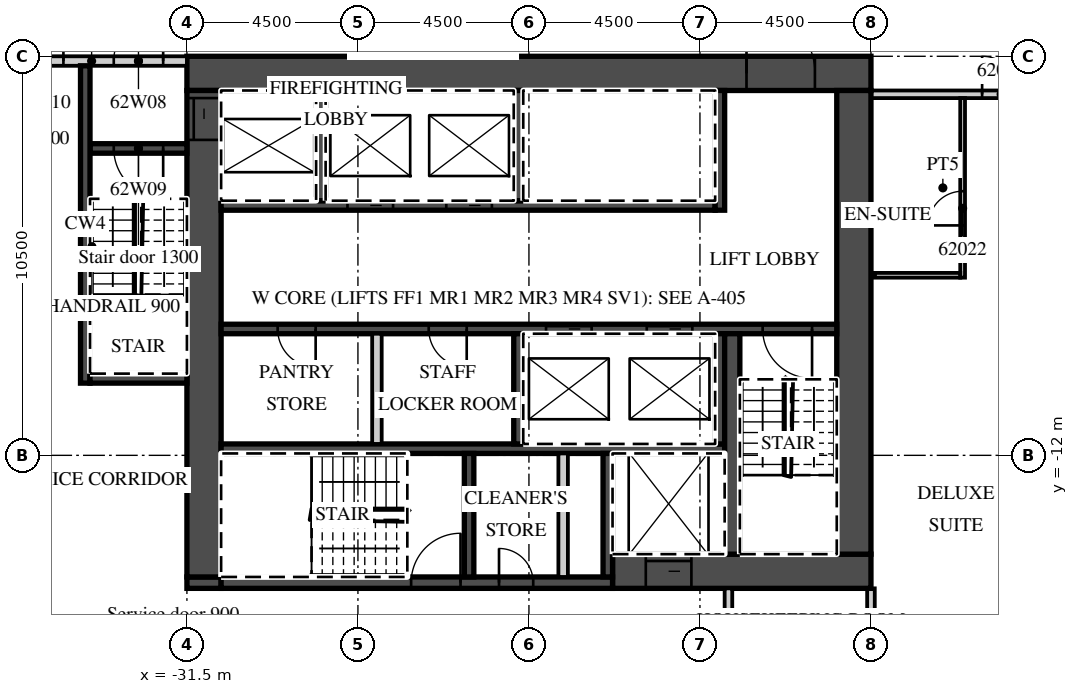
"""IFC4 building model, lengths in metres.
Left out: names, types, materials, properties, quantities, classifications, styles, units other than length and angle.
Written with IfcOpenShell. Run it as: python <this file> out.ifc"""

import sys

from ifc_helpers import new_model, si_unit, direction, frame, frame_2d, origin, place, context, subcontext, project, spatial, rectangle, extrude, element, fill, save


model = new_model("IFC4")
c1 = context("Model", 3, precision=1e-05, world=origin(), true_north=direction((0.0, 1.0)))
c2 = subcontext(c1, "Body", "Model", "MODEL_VIEW")
j1 = project(units=[si_unit("LENGTHUNIT", "METRE"), si_unit("PLANEANGLEUNIT", "RADIAN")], contexts=[c1])
p1 = place(None, origin())
s1 = spatial("IfcSite", under=j1, at=p1, CompositionType="ELEMENT")
p2 = place(p1, origin())
s2 = spatial("IfcBuilding", under=s1, at=p2, CompositionType="ELEMENT")
p3 = place(p2, frame((0.0, 0.0, 250.7)))
s3 = spatial("IfcBuildingStorey", under=s2, at=p3, CompositionType="ELEMENT", Elevation=250.7)
p4 = place(p3, frame((-13.5, -19.641, 0.0), z_axis=(0.0, 0.0, 1.0), x_axis=(0.0, 1.0, 0.0)))
e1 = element("IfcWall", 1, at=p4, inside=s3, PredefinedType="PARTITIONING", context=c2, shape_type="SweptSolid", body=[
    extrude(rectangle(XDim=4.141, YDim=0.2, at=frame_2d((2.071, 0.0))), origin(), (0.0, 0.0, 1.0), 3.02),
])
p5 = place(p3, frame((-13.5, -2.5, 0.0), z_axis=(0.0, 0.0, 1.0), x_axis=(1.0, 0.0, 0.0)))
e2 = element("IfcWall", 2, at=p5, inside=s3, PredefinedType="PARTITIONING", context=c2, shape_type="SweptSolid", body=[
    extrude(rectangle(XDim=27.0, YDim=0.2, at=frame_2d((13.5, 0.0))), origin(), (0.0, 0.0, 1.0), 3.02),
])
p6 = place(p5, frame((2.925, 0.0, 0.0)))
e3 = element("IfcOpeningElement", 3, at=p6, cuts=e2, PredefinedType="OPENING", context=c2, shape_type="SweptSolid", body=[
    extrude(rectangle(XDim=1.0, YDim=2.1, at=frame_2d((0.5, 1.05))), frame((0.0, 0.11, 0.0), z_axis=(0.0, -1.0, 0.0), x_axis=(1.0, 0.0, 0.0)), (0.0, 0.0, 1.0), 0.22),
])
p7 = place(p5, frame((6.938, 0.0, 0.0)))
e4 = element("IfcOpeningElement", 4, at=p7, cuts=e2, PredefinedType="OPENING", context=c2, shape_type="SweptSolid", body=[
    extrude(rectangle(XDim=1.2, YDim=2.1, at=frame_2d((0.6, 1.05))), frame((0.0, 0.11, 0.0), z_axis=(0.0, -1.0, 0.0), x_axis=(1.0, 0.0, 0.0)), (0.0, 0.0, 1.0), 0.22),
])
p8 = place(p5, frame((18.862, 0.0, 0.0)))
e5 = element("IfcOpeningElement", 5, at=p8, cuts=e2, PredefinedType="OPENING", context=c2, shape_type="SweptSolid", body=[
    extrude(rectangle(XDim=1.2, YDim=2.1, at=frame_2d((0.6, 1.05))), frame((0.0, 0.11, 0.0), z_axis=(0.0, -1.0, 0.0), x_axis=(1.0, 0.0, 0.0)), (0.0, 0.0, 1.0), 0.22),
])
p9 = place(p5, frame((23.075, 0.0, 0.0)))
e6 = element("IfcOpeningElement", 6, at=p9, cuts=e2, PredefinedType="OPENING", context=c2, shape_type="SweptSolid", body=[
    extrude(rectangle(XDim=1.0, YDim=2.1, at=frame_2d((0.5, 1.05))), frame((0.0, 0.11, 0.0), z_axis=(0.0, -1.0, 0.0), x_axis=(1.0, 0.0, 0.0)), (0.0, 0.0, 1.0), 0.22),
])
p10 = place(p3, frame((-11.088, -7.325, 0.0), z_axis=(0.0, 0.0, 1.0), x_axis=(0.0, 1.0, 0.0)))
e7 = element("IfcWall", 7, at=p10, inside=s3, PredefinedType="PARTITIONING", context=c2, shape_type="SweptSolid", body=[
    extrude(rectangle(XDim=4.725, YDim=0.125, at=frame_2d((2.362, 0.0))), origin(), (0.0, 0.0, 1.0), 3.02),
])
p11 = place(p10, frame((1.375, 0.0, 0.0)))
e8 = element("IfcOpeningElement", 8, at=p11, cuts=e7, PredefinedType="OPENING", context=c2, shape_type="SweptSolid", body=[
    extrude(rectangle(XDim=0.9, YDim=2.1, at=frame_2d((0.45, 1.05))), frame((0.0, 0.073, 0.0), z_axis=(0.0, -1.0, 0.0), x_axis=(1.0, 0.0, 0.0)), (0.0, 0.0, 1.0), 0.145),
])
p12 = place(p3, frame((-13.4, -7.262, 0.0), z_axis=(0.0, 0.0, 1.0), x_axis=(1.0, 0.0, 0.0)))
e9 = element("IfcWall", 9, at=p12, inside=s3, PredefinedType="PARTITIONING", context=c2, shape_type="SweptSolid", body=[
    extrude(rectangle(XDim=2.25, YDim=0.125, at=frame_2d((1.125, 0.0))), origin(), (0.0, 0.0, 1.0), 3.02),
])
p13 = place(p3, frame((-31.5, -1.95, 0.0), z_axis=(0.0, 0.0, 1.0), x_axis=(1.0, 0.0, 0.0)))
e10 = element("IfcWall", 10, at=p13, inside=s3, PredefinedType="SHEAR", context=c2, shape_type="SweptSolid", body=[
    extrude(rectangle(XDim=18.0, YDim=0.9, at=frame_2d((9.0, 0.0))), origin(), (0.0, 0.0, 1.0), 3.02),
])
p14 = place(p13, frame((14.725, 0.0, 0.0)))
e11 = element("IfcOpeningElement", 11, at=p14, cuts=e10, PredefinedType="OPENING", context=c2, shape_type="SweptSolid", body=[
    extrude(rectangle(XDim=1.8, YDim=2.1, at=frame_2d((0.9, 1.05))), frame((0.0, 0.46, 0.0), z_axis=(0.0, -1.0, 0.0), x_axis=(1.0, 0.0, 0.0)), (0.0, 0.0, 1.0), 0.92),
])
p15 = place(p3, frame((-20.3, -15.05, 0.0), z_axis=(0.0, 0.0, 1.0), x_axis=(1.0, 0.0, 0.0)))
e12 = element("IfcWall", 12, at=p15, inside=s3, PredefinedType="SHEAR", context=c2, shape_type="SweptSolid", body=[
    extrude(rectangle(XDim=6.8, YDim=0.9, at=frame_2d((3.4, 0.0))), origin(), (0.0, 0.0, 1.0), 3.02),
])
p16 = place(p15, frame((0.875, 0.0, 0.0)))
e13 = element("IfcOpeningElement", 13, at=p16, cuts=e12, PredefinedType="OPENING", context=c2, shape_type="SweptSolid", body=[
    extrude(rectangle(XDim=1.2, YDim=2.1, at=frame_2d((0.6, 1.05))), frame((0.0, 0.46, 0.0), z_axis=(0.0, -1.0, 0.0), x_axis=(1.0, 0.0, 0.0)), (0.0, 0.0, 1.0), 0.92),
])
p17 = place(p3, frame((-31.5, -15.35, 0.0), z_axis=(0.0, 0.0, 1.0), x_axis=(1.0, 0.0, 0.0)))
e14 = element("IfcWall", 14, at=p17, inside=s3, PredefinedType="SHEAR", context=c2, shape_type="SweptSolid", body=[
    extrude(rectangle(XDim=0.9, YDim=0.3, at=frame_2d((0.45, 0.0))), origin(), (0.0, 0.0, 1.0), 3.02),
])
p18 = place(p3, frame((-30.6, -15.35, 0.0), z_axis=(0.0, 0.0, 1.0), x_axis=(1.0, 0.0, 0.0)))
e15 = element("IfcWall", 15, at=p18, inside=s3, PredefinedType="SHEAR", context=c2, shape_type="SweptSolid", body=[
    extrude(rectangle(XDim=10.3, YDim=0.3, at=frame_2d((5.15, 0.0))), origin(), (0.0, 0.0, 1.0), 3.02),
])
p19 = place(p18, frame((5.0, 0.0, 0.0)))
e16 = element("IfcOpeningElement", 16, at=p19, cuts=e15, PredefinedType="OPENING", context=c2, shape_type="SweptSolid", body=[
    extrude(rectangle(XDim=1.3, YDim=2.1, at=frame_2d((0.65, 1.05))), frame((0.0, 0.16, 0.0), z_axis=(0.0, -1.0, 0.0), x_axis=(1.0, 0.0, 0.0)), (0.0, 0.0, 1.0), 0.32),
])
p20 = place(p18, frame((7.312, 0.0, 0.0)))
e17 = element("IfcOpeningElement", 17, at=p20, cuts=e15, PredefinedType="OPENING", context=c2, shape_type="SweptSolid", body=[
    extrude(rectangle(XDim=0.9, YDim=2.1, at=frame_2d((0.45, 1.05))), frame((0.0, 0.16, 0.0), z_axis=(0.0, -1.0, 0.0), x_axis=(1.0, 0.0, 0.0)), (0.0, 0.0, 1.0), 0.32),
])
p21 = place(p3, frame((-31.05, -15.2, 0.0), z_axis=(0.0, 0.0, 1.0), x_axis=(0.0, 1.0, 0.0)))
e18 = element("IfcWall", 18, at=p21, inside=s3, PredefinedType="SHEAR", context=c2, shape_type="SweptSolid", body=[
    extrude(rectangle(XDim=12.8, YDim=0.9, at=frame_2d((6.4, 0.0))), origin(), (0.0, 0.0, 1.0), 3.02),
])
p22 = place(p21, frame((11.5, 0.0, 0.0)))
e19 = element("IfcOpeningElement", 19, at=p22, cuts=e18, PredefinedType="OPENING", context=c2, shape_type="SweptSolid", body=[
    extrude(rectangle(XDim=1.1, YDim=2.1, at=frame_2d((0.55, 1.05))), frame((0.0, 0.46, 0.0), z_axis=(0.0, -1.0, 0.0), x_axis=(1.0, 0.0, 0.0)), (0.0, 0.0, 1.0), 0.92),
])
p23 = place(p3, frame((-13.95, -14.6, 0.0), z_axis=(0.0, 0.0, 1.0), x_axis=(0.0, 1.0, 0.0)))
e20 = element("IfcWall", 20, at=p23, inside=s3, PredefinedType="SHEAR", context=c2, shape_type="SweptSolid", body=[
    extrude(rectangle(XDim=12.2, YDim=0.9, at=frame_2d((6.1, 0.0))), origin(), (0.0, 0.0, 1.0), 3.02),
])
p24 = place(p3, frame((-30.6, -5.425, 0.0), z_axis=(0.0, 0.0, 1.0), x_axis=(1.0, 0.0, 0.0)))
e21 = element("IfcWall", 21, at=p24, inside=s3, PredefinedType="SHEAR", context=c2, shape_type="SweptSolid", body=[
    extrude(rectangle(XDim=13.0, YDim=0.25, at=frame_2d((6.5, 0.0))), origin(), (0.0, 0.0, 1.0), 3.02),
])
p25 = place(p24, frame((3.325, 0.0, 0.0)))
e22 = element("IfcOpeningElement", 22, at=p25, cuts=e21, PredefinedType="OPENING", context=c2, shape_type="SweptSolid", body=[
    extrude(rectangle(XDim=1.2, YDim=2.1, at=frame_2d((0.6, 1.05))), frame((0.0, 0.135, 0.0), z_axis=(0.0, -1.0, 0.0), x_axis=(1.0, 0.0, 0.0)), (0.0, 0.0, 1.0), 0.27),
])
p26 = place(p24, frame((5.925, 0.0, 0.0)))
e23 = element("IfcOpeningElement", 23, at=p26, cuts=e21, PredefinedType="OPENING", context=c2, shape_type="SweptSolid", body=[
    extrude(rectangle(XDim=1.2, YDim=2.1, at=frame_2d((0.6, 1.05))), frame((0.0, 0.135, 0.0), z_axis=(0.0, -1.0, 0.0), x_axis=(1.0, 0.0, 0.0)), (0.0, 0.0, 1.0), 0.27),
])
p27 = place(p3, frame((-17.475, -5.55, 0.0), z_axis=(0.0, 0.0, 1.0), x_axis=(0.0, 1.0, 0.0)))
e24 = element("IfcWall", 24, at=p27, inside=s3, PredefinedType="SHEAR", context=c2, shape_type="SweptSolid", body=[
    extrude(rectangle(XDim=3.15, YDim=0.25, at=frame_2d((1.575, 0.0))), origin(), (0.0, 0.0, 1.0), 3.02),
])
for number, where, z_axis, x_axis in (
    (25, (-27.975, -5.3, 0.0), (0.0, 0.0, 1.0), (0.0, 1.0, 0.0)),
    (26, (-22.775, -5.3, 0.0), (0.0, 0.0, 1.0), (0.0, 1.0, 0.0)),
):
    element("IfcWall", number, at=place(p3, frame(where, z_axis=z_axis, x_axis=x_axis)), inside=s3, PredefinedType="SHEAR", context=c2, shape_type="SweptSolid", body=[
        extrude(rectangle(XDim=2.9, YDim=0.25, at=frame_2d((1.45, 0.0))), origin(), (0.0, 0.0, 1.0), 3.02),
    ])
p28 = place(p3, frame((-30.6, -8.675, 0.0), z_axis=(0.0, 0.0, 1.0), x_axis=(1.0, 0.0, 0.0)))
e27 = element("IfcWall", 27, at=p28, inside=s3, PredefinedType="SHEAR", context=c2, shape_type="SweptSolid", body=[
    extrude(rectangle(XDim=16.2, YDim=0.25, at=frame_2d((8.1, 0.0))), origin(), (0.0, 0.0, 1.0), 3.02),
])
p29 = place(p28, frame((8.55, 0.0, 0.0)))
e28 = element("IfcOpeningElement", 28, at=p29, cuts=e27, PredefinedType="OPENING", context=c2, shape_type="SweptSolid", body=[
    extrude(rectangle(XDim=1.2, YDim=2.1, at=frame_2d((0.6, 1.05))), frame((0.0, 0.135, 0.0), z_axis=(0.0, -1.0, 0.0), x_axis=(1.0, 0.0, 0.0)), (0.0, 0.0, 1.0), 0.27),
])
p30 = place(p28, frame((11.2, 0.0, 0.0)))
e29 = element("IfcOpeningElement", 29, at=p30, cuts=e27, PredefinedType="OPENING", context=c2, shape_type="SweptSolid", body=[
    extrude(rectangle(XDim=1.2, YDim=2.1, at=frame_2d((0.6, 1.05))), frame((0.0, 0.135, 0.0), z_axis=(0.0, -1.0, 0.0), x_axis=(1.0, 0.0, 0.0)), (0.0, 0.0, 1.0), 0.27),
])
p31 = place(p28, frame((14.25, 0.0, 0.0)))
e30 = element("IfcOpeningElement", 30, at=p31, cuts=e27, PredefinedType="OPENING", context=c2, shape_type="SweptSolid", body=[
    extrude(rectangle(XDim=1.3, YDim=2.1, at=frame_2d((0.65, 1.05))), frame((0.0, 0.135, 0.0), z_axis=(0.0, -1.0, 0.0), x_axis=(1.0, 0.0, 0.0)), (0.0, 0.0, 1.0), 0.27),
])
p32 = place(p28, frame((1.488, 0.0, 0.0)))
e31 = element("IfcOpeningElement", 31, at=p32, cuts=e27, PredefinedType="OPENING", context=c2, shape_type="SweptSolid", body=[
    extrude(rectangle(XDim=1.0, YDim=2.1, at=frame_2d((0.5, 1.05))), frame((0.0, 0.135, 0.0), z_axis=(0.0, -1.0, 0.0), x_axis=(1.0, 0.0, 0.0)), (0.0, 0.0, 1.0), 0.27),
])
p33 = place(p28, frame((5.462, 0.0, 0.0)))
e32 = element("IfcOpeningElement", 32, at=p33, cuts=e27, PredefinedType="OPENING", context=c2, shape_type="SweptSolid", body=[
    extrude(rectangle(XDim=1.0, YDim=2.1, at=frame_2d((0.5, 1.05))), frame((0.0, 0.135, 0.0), z_axis=(0.0, -1.0, 0.0), x_axis=(1.0, 0.0, 0.0)), (0.0, 0.0, 1.0), 0.27),
])
p34 = place(p3, frame((-30.6, -11.825, 0.0), z_axis=(0.0, 0.0, 1.0), x_axis=(1.0, 0.0, 0.0)))
e33 = element("IfcWall", 33, at=p34, inside=s3, PredefinedType="SHEAR", context=c2, shape_type="SweptSolid", body=[
    extrude(rectangle(XDim=13.25, YDim=0.25, at=frame_2d((6.625, 0.0))), origin(), (0.0, 0.0, 1.0), 3.02),
])
for number, where, z_axis, x_axis in (
    (34, (-17.475, -11.7, 0.0), (0.0, 0.0, 1.0), (0.0, 1.0, 0.0)),
    (35, (-22.775, -11.7, 0.0), (0.0, 0.0, 1.0), (0.0, 1.0, 0.0)),
):
    element("IfcWall", number, at=place(p3, frame(where, z_axis=z_axis, x_axis=x_axis)), inside=s3, PredefinedType="SHEAR", context=c2, shape_type="SweptSolid", body=[
        extrude(rectangle(XDim=2.9, YDim=0.25, at=frame_2d((1.45, 0.0))), origin(), (0.0, 0.0, 1.0), 3.02),
    ])
p35 = place(p3, frame((-26.5, -11.7, 0.0), z_axis=(0.0, 0.0, 1.0), x_axis=(0.0, 1.0, 0.0)))
e36 = element("IfcWall", 36, at=p35, inside=s3, PredefinedType="PARTITIONING", context=c2, shape_type="SweptSolid", body=[
    extrude(rectangle(XDim=2.9, YDim=0.25, at=frame_2d((1.45, 0.0))), origin(), (0.0, 0.0, 1.0), 3.02),
])
p36 = place(p3, frame((-17.15, -14.6, 0.0), z_axis=(0.0, 0.0, 1.0), x_axis=(0.0, 1.0, 0.0)))
e37 = element("IfcWall", 37, at=p36, inside=s3, PredefinedType="SHEAR", context=c2, shape_type="SweptSolid", body=[
    extrude(rectangle(XDim=5.8, YDim=0.4, at=frame_2d((2.9, 0.0))), origin(), (0.0, 0.0, 1.0), 3.02),
])
for number, where, z_axis, x_axis in (
    (38, (-20.425, -15.2, 0.0), (0.0, 0.0, 1.0), (0.0, 1.0, 0.0)),
    (39, (-24.075, -15.2, 0.0), (0.0, 0.0, 1.0), (0.0, 1.0, 0.0)),
):
    element("IfcWall", number, at=place(p3, frame(where, z_axis=z_axis, x_axis=x_axis)), inside=s3, PredefinedType="SHEAR", context=c2, shape_type="SweptSolid", body=[
        extrude(rectangle(XDim=3.25, YDim=0.25, at=frame_2d((1.625, 0.0))), origin(), (0.0, 0.0, 1.0), 3.02),
    ])
p37 = place(p3, frame((-21.6, -15.2, 0.0), z_axis=(0.0, 0.0, 1.0), x_axis=(0.0, 1.0, 0.0)))
e40 = element("IfcWall", 40, at=p37, inside=s3, PredefinedType="PARTITIONING", context=c2, shape_type="SweptSolid", body=[
    extrude(rectangle(XDim=3.25, YDim=0.25, at=frame_2d((1.625, 0.0))), origin(), (0.0, 0.0, 1.0), 3.02),
])
p38 = place(p3, frame((-36.515, -1.625, 0.0), z_axis=(0.0, 0.0, 1.0), x_axis=(1.0, 0.0, 0.0)))
e41 = element("IfcWall", 41, at=p38, inside=s3, PredefinedType="PARTITIONING", context=c2, shape_type="SweptSolid", body=[
    extrude(rectangle(XDim=5.015, YDim=0.25, at=frame_2d((2.508, 0.0))), origin(), (0.0, 0.0, 1.0), 3.02),
])
p39 = place(p38, frame((3.09, 0.0, 0.0)))
e42 = element("IfcOpeningElement", 42, at=p39, cuts=e41, PredefinedType="OPENING", context=c2, shape_type="SweptSolid", body=[
    extrude(rectangle(XDim=1.3, YDim=2.1, at=frame_2d((0.65, 1.05))), frame((0.0, 0.135, 0.0), z_axis=(0.0, -1.0, 0.0), x_axis=(1.0, 0.0, 0.0)), (0.0, 0.0, 1.0), 0.27),
])
p40 = place(p38, frame((0.665, 0.0, 0.0)))
e43 = element("IfcOpeningElement", 43, at=p40, cuts=e41, PredefinedType="OPENING", context=c2, shape_type="SweptSolid", body=[
    extrude(rectangle(XDim=1.1, YDim=2.1, at=frame_2d((0.55, 1.05))), frame((0.0, 0.135, 0.0), z_axis=(0.0, -1.0, 0.0), x_axis=(1.0, 0.0, 0.0)), (0.0, 0.0, 1.0), 0.27),
])
p41 = place(p3, frame((-34.05, -3.925, 0.0), z_axis=(0.0, 0.0, 1.0), x_axis=(1.0, 0.0, 0.0)))
e44 = element("IfcWall", 44, at=p41, inside=s3, PredefinedType="SHEAR", context=c2, shape_type="SweptSolid", body=[
    extrude(rectangle(XDim=2.55, YDim=0.25, at=frame_2d((1.275, 0.0))), origin(), (0.0, 0.0, 1.0), 3.02),
])
p42 = place(p41, frame((0.625, 0.0, 0.0)))
e45 = element("IfcOpeningElement", 45, at=p42, cuts=e44, PredefinedType="OPENING", context=c2, shape_type="SweptSolid", body=[
    extrude(rectangle(XDim=1.3, YDim=2.1, at=frame_2d((0.65, 1.05))), frame((0.0, 0.135, 0.0), z_axis=(0.0, -1.0, 0.0), x_axis=(1.0, 0.0, 0.0)), (0.0, 0.0, 1.0), 0.27),
])
p43 = place(p3, frame((-34.175, -10.1, 0.0), z_axis=(0.0, 0.0, 1.0), x_axis=(0.0, 1.0, 0.0)))
e46 = element("IfcWall", 46, at=p43, inside=s3, PredefinedType="SHEAR", context=c2, shape_type="SweptSolid", body=[
    extrude(rectangle(XDim=8.35, YDim=0.25, at=frame_2d((4.175, 0.0))), origin(), (0.0, 0.0, 1.0), 3.02),
])
p44 = place(p3, frame((-34.05, -9.975, 0.0), z_axis=(0.0, 0.0, 1.0), x_axis=(1.0, 0.0, 0.0)))
e47 = element("IfcWall", 47, at=p44, inside=s3, PredefinedType="SHEAR", context=c2, shape_type="SweptSolid", body=[
    extrude(rectangle(XDim=2.55, YDim=0.25, at=frame_2d((1.275, 0.0))), origin(), (0.0, 0.0, 1.0), 3.02),
])
p45 = place(p3, frame((-17.25, -17.7, 0.0), z_axis=(0.0, 0.0, 1.0), x_axis=(0.0, 1.0, 0.0)))
e48 = element("IfcWall", 48, at=p45, inside=s3, PredefinedType="PARTITIONING", context=c2, shape_type="SweptSolid", body=[
    extrude(rectangle(XDim=2.2, YDim=0.2, at=frame_2d((1.1, 0.0))), origin(), (0.0, 0.0, 1.0), 3.02),
])
p46 = place(p6, origin())
e49 = element("IfcDoor", 49, at=p46, inside=s3, OperationType="SINGLE_SWING_LEFT", PredefinedType="DOOR", context=c2, shape_type="SweptSolid", body=[
    extrude(rectangle(XDim=1.0, YDim=2.1, at=frame_2d((0.5, 1.05))), frame((0.0, 0.025, 0.0), z_axis=(0.0, -1.0, 0.0), x_axis=(1.0, 0.0, 0.0)), (0.0, 0.0, 1.0), 0.05),
])
fill(e3, e49)
p47 = place(p11, origin())
e50 = element("IfcDoor", 50, at=p47, inside=s3, OperationType="SINGLE_SWING_LEFT", PredefinedType="DOOR", context=c2, shape_type="SweptSolid", body=[
    extrude(rectangle(XDim=0.9, YDim=2.1, at=frame_2d((0.45, 1.05))), frame((0.0, 0.025, 0.0), z_axis=(0.0, -1.0, 0.0), x_axis=(1.0, 0.0, 0.0)), (0.0, 0.0, 1.0), 0.05),
])
fill(e8, e50)
p48 = place(p29, origin())
e51 = element("IfcDoor", 51, at=p48, inside=s3, OperationType="SLIDING_TO_LEFT", PredefinedType="DOOR", context=c2, shape_type="SweptSolid", body=[
    extrude(rectangle(XDim=1.2, YDim=2.1, at=frame_2d((0.6, 1.05))), frame((0.0, 0.025, 0.0), z_axis=(0.0, -1.0, 0.0), x_axis=(1.0, 0.0, 0.0)), (0.0, 0.0, 1.0), 0.05),
])
fill(e28, e51)
p49 = place(p30, origin())
e52 = element("IfcDoor", 52, at=p49, inside=s3, OperationType="SLIDING_TO_RIGHT", PredefinedType="DOOR", context=c2, shape_type="SweptSolid", body=[
    extrude(rectangle(XDim=1.2, YDim=2.1, at=frame_2d((0.6, 1.05))), frame((0.0, 0.025, 0.0), z_axis=(0.0, -1.0, 0.0), x_axis=(1.0, 0.0, 0.0)), (0.0, 0.0, 1.0), 0.05),
])
fill(e29, e52)
p50 = place(p25, origin())
e53 = element("IfcDoor", 53, at=p50, inside=s3, OperationType="SLIDING_TO_RIGHT", PredefinedType="DOOR", context=c2, shape_type="SweptSolid", body=[
    extrude(rectangle(XDim=1.2, YDim=2.1, at=frame_2d((0.6, 1.05))), frame((0.0, 0.025, 0.0), z_axis=(0.0, -1.0, 0.0), x_axis=(1.0, 0.0, 0.0)), (0.0, 0.0, 1.0), 0.05),
])
fill(e22, e53)
p51 = place(p26, origin())
e54 = element("IfcDoor", 54, at=p51, inside=s3, OperationType="SLIDING_TO_RIGHT", PredefinedType="DOOR", context=c2, shape_type="SweptSolid", body=[
    extrude(rectangle(XDim=1.2, YDim=2.1, at=frame_2d((0.6, 1.05))), frame((0.0, 0.025, 0.0), z_axis=(0.0, -1.0, 0.0), x_axis=(1.0, 0.0, 0.0)), (0.0, 0.0, 1.0), 0.05),
])
fill(e23, e54)
p52 = place(p16, origin())
e55 = element("IfcDoor", 55, at=p52, inside=s3, OperationType="SLIDING_TO_LEFT", PredefinedType="DOOR", context=c2, shape_type="SweptSolid", body=[
    extrude(rectangle(XDim=1.2, YDim=2.1, at=frame_2d((0.6, 1.05))), frame((0.0, 0.025, 0.0), z_axis=(0.0, -1.0, 0.0), x_axis=(1.0, 0.0, 0.0)), (0.0, 0.0, 1.0), 0.05),
])
fill(e13, e55)
p53 = place(p22, origin())
e56 = element("IfcDoor", 56, at=p53, inside=s3, OperationType="SLIDING_TO_RIGHT", PredefinedType="DOOR", context=c2, shape_type="SweptSolid", body=[
    extrude(rectangle(XDim=1.1, YDim=2.1, at=frame_2d((0.55, 1.05))), frame((0.0, 0.025, 0.0), z_axis=(0.0, -1.0, 0.0), x_axis=(1.0, 0.0, 0.0)), (0.0, 0.0, 1.0), 0.05),
])
fill(e19, e56)
p54 = place(p14, origin())
e57 = element("IfcDoor", 57, at=p54, inside=s3, OperationType="DOUBLE_DOOR_DOUBLE_SWING", PredefinedType="DOOR", context=c2, shape_type="SweptSolid", body=[
    extrude(rectangle(XDim=1.8, YDim=2.1, at=frame_2d((0.9, 1.05))), frame((0.0, 0.025, 0.0), z_axis=(0.0, -1.0, 0.0), x_axis=(1.0, 0.0, 0.0)), (0.0, 0.0, 1.0), 0.05),
])
fill(e11, e57)
p55 = place(p39, origin())
e58 = element("IfcDoor", 58, at=p55, inside=s3, OperationType="SINGLE_SWING_RIGHT", PredefinedType="DOOR", context=c2, shape_type="SweptSolid", body=[
    extrude(rectangle(XDim=1.3, YDim=2.1, at=frame_2d((0.65, 1.05))), frame((0.0, 0.025, 0.0), z_axis=(0.0, -1.0, 0.0), x_axis=(1.0, 0.0, 0.0)), (0.0, 0.0, 1.0), 0.05),
])
fill(e42, e58)
p56 = place(p42, origin())
e59 = element("IfcDoor", 59, at=p56, inside=s3, OperationType="SINGLE_SWING_RIGHT", PredefinedType="DOOR", context=c2, shape_type="SweptSolid", body=[
    extrude(rectangle(XDim=1.3, YDim=2.1, at=frame_2d((0.65, 1.05))), frame((0.0, 0.025, 0.0), z_axis=(0.0, -1.0, 0.0), x_axis=(1.0, 0.0, 0.0)), (0.0, 0.0, 1.0), 0.05),
])
fill(e45, e59)
p57 = place(p40, origin())
e60 = element("IfcDoor", 60, at=p57, inside=s3, OperationType="SINGLE_SWING_RIGHT", PredefinedType="DOOR", context=c2, shape_type="SweptSolid", body=[
    extrude(rectangle(XDim=1.1, YDim=2.1, at=frame_2d((0.55, 1.05))), frame((0.0, 0.025, 0.0), z_axis=(0.0, -1.0, 0.0), x_axis=(1.0, 0.0, 0.0)), (0.0, 0.0, 1.0), 0.05),
])
fill(e43, e60)
p58 = place(p31, origin())
e61 = element("IfcDoor", 61, at=p58, inside=s3, OperationType="SINGLE_SWING_RIGHT", PredefinedType="DOOR", context=c2, shape_type="SweptSolid", body=[
    extrude(rectangle(XDim=1.3, YDim=2.1, at=frame_2d((0.65, 1.05))), frame((0.0, 0.025, 0.0), z_axis=(0.0, -1.0, 0.0), x_axis=(1.0, 0.0, 0.0)), (0.0, 0.0, 1.0), 0.05),
])
fill(e30, e61)
p59 = place(p19, origin())
e62 = element("IfcDoor", 62, at=p59, inside=s3, OperationType="SINGLE_SWING_RIGHT", PredefinedType="DOOR", context=c2, shape_type="SweptSolid", body=[
    extrude(rectangle(XDim=1.3, YDim=2.1, at=frame_2d((0.65, 1.05))), frame((0.0, 0.025, 0.0), z_axis=(0.0, -1.0, 0.0), x_axis=(1.0, 0.0, 0.0)), (0.0, 0.0, 1.0), 0.05),
])
fill(e16, e62)
p60 = place(p20, origin())
e63 = element("IfcDoor", 63, at=p60, inside=s3, OperationType="SINGLE_SWING_LEFT", PredefinedType="DOOR", context=c2, shape_type="SweptSolid", body=[
    extrude(rectangle(XDim=0.9, YDim=2.1, at=frame_2d((0.45, 1.05))), frame((0.0, 0.025, 0.0), z_axis=(0.0, -1.0, 0.0), x_axis=(1.0, 0.0, 0.0)), (0.0, 0.0, 1.0), 0.05),
])
fill(e17, e63)
p61 = place(p32, origin())
e64 = element("IfcDoor", 64, at=p61, inside=s3, OperationType="SINGLE_SWING_RIGHT", PredefinedType="DOOR", context=c2, shape_type="SweptSolid", body=[
    extrude(rectangle(XDim=1.0, YDim=2.1, at=frame_2d((0.5, 1.05))), frame((0.0, 0.025, 0.0), z_axis=(0.0, -1.0, 0.0), x_axis=(1.0, 0.0, 0.0)), (0.0, 0.0, 1.0), 0.05),
])
fill(e31, e64)
p62 = place(p33, origin())
e65 = element("IfcDoor", 65, at=p62, inside=s3, OperationType="SINGLE_SWING_RIGHT", PredefinedType="DOOR", context=c2, shape_type="SweptSolid", body=[
    extrude(rectangle(XDim=1.0, YDim=2.1, at=frame_2d((0.5, 1.05))), frame((0.0, 0.025, 0.0), z_axis=(0.0, -1.0, 0.0), x_axis=(1.0, 0.0, 0.0)), (0.0, 0.0, 1.0), 0.05),
])
fill(e32, e65)
save(model, sys.argv[1])
